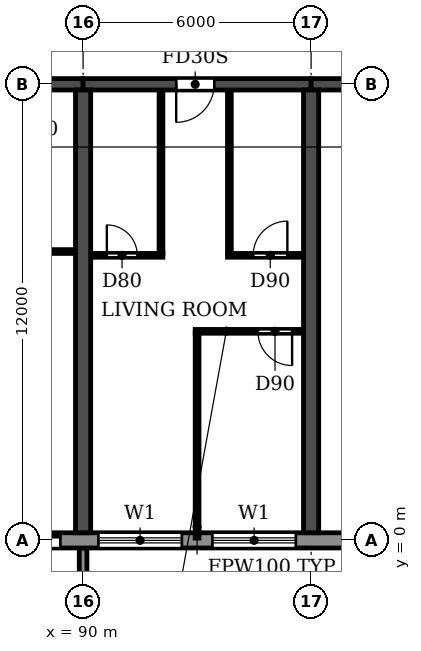
"""IFC4 building model, lengths in metres.
Left out: names, types, materials, properties, quantities, classifications, styles, units other than length and angle.
Written with IfcOpenShell. Run it as: python <this file> out.ifc"""

import sys

from ifc_helpers import new_model, si_unit, direction, frame, frame_2d, origin, place, context, subcontext, project, spatial, polyline, rectangle, outline, extrude, source, transform, mapped, element, fill, save


model = new_model("IFC4")
c1 = context("Model", 3, precision=1e-05, world=origin(), true_north=direction((0.0, 1.0)))
c2 = subcontext(c1, "Body", "Model", "MODEL_VIEW")
j1 = project(units=[si_unit("LENGTHUNIT", "METRE"), si_unit("PLANEANGLEUNIT", "RADIAN")], contexts=[c1])
p1 = place(None, origin())
s1 = spatial("IfcSite", under=j1, at=p1, CompositionType="ELEMENT")
p2 = place(p1, origin())
s2 = spatial("IfcBuilding", under=s1, at=p2, CompositionType="ELEMENT")
p3 = place(p2, frame((0.0, 0.0, 49.8)))
s3 = spatial("IfcBuildingStorey", under=s2, at=p3, CompositionType="ELEMENT", Elevation=49.8)
for number, where, z_axis, x_axis in (
    (1, (90.0, 0.2, 0.0), (0.0, 0.0, 1.0), (0.0, 1.0, 0.0)),
    (2, (96.0, 0.2, 0.0), (0.0, 0.0, 1.0), (0.0, 1.0, 0.0)),
):
    element("IfcWall", number, at=place(p3, frame(where, z_axis=z_axis, x_axis=x_axis)), inside=s3, PredefinedType="SHEAR", context=c2, shape_type="SweptSolid", body=[
        extrude(rectangle(XDim=11.65, YDim=0.4, at=frame_2d((5.825, 0.0))), origin(), (0.0, 0.0, 1.0), 3.0),
    ])
p4 = place(p3, frame((84.0, 12.0, 0.0), z_axis=(0.0, 0.0, 1.0), x_axis=(1.0, 0.0, 0.0)))
e3 = element("IfcWall", 3, at=p4, inside=s3, PredefinedType="SHEAR", context=c2, shape_type="SweptSolid", body=[
    extrude(rectangle(XDim=6.0, YDim=0.3, at=frame_2d((3.0, 0.0))), origin(), (0.0, 0.0, 1.0), 2.4),
])
p5 = place(p4, frame((2.45, 0.0, 0.0)))
e4 = element("IfcOpeningElement", 4, at=p5, cuts=e3, PredefinedType="OPENING", context=c2, shape_type="SweptSolid", body=[
    extrude(rectangle(XDim=1.0, YDim=2.1, at=frame_2d((0.5, 1.05))), frame((0.0, 0.16, 0.0), z_axis=(0.0, -1.0, 0.0), x_axis=(1.0, 0.0, 0.0)), (0.0, 0.0, 1.0), 0.32),
])
p6 = place(p3, frame((90.0, 12.0, 0.0), z_axis=(0.0, 0.0, 1.0), x_axis=(1.0, 0.0, 0.0)))
e5 = element("IfcWall", 5, at=p6, inside=s3, PredefinedType="SHEAR", context=c2, shape_type="SweptSolid", body=[
    extrude(rectangle(XDim=6.0, YDim=0.3, at=frame_2d((3.0, 0.0))), origin(), (0.0, 0.0, 1.0), 2.4),
])
p7 = place(p6, frame((2.45, 0.0, 0.0)))
e6 = element("IfcOpeningElement", 6, at=p7, cuts=e5, PredefinedType="OPENING", context=c2, shape_type="SweptSolid", body=[
    extrude(rectangle(XDim=1.0, YDim=2.1, at=frame_2d((0.5, 1.05))), frame((0.0, 0.16, 0.0), z_axis=(0.0, -1.0, 0.0), x_axis=(1.0, 0.0, 0.0)), (0.0, 0.0, 1.0), 0.32),
])
p8 = place(p3, frame((96.0, 12.0, 0.0), z_axis=(0.0, 0.0, 1.0), x_axis=(1.0, 0.0, 0.0)))
e7 = element("IfcWall", 7, at=p8, inside=s3, PredefinedType="SHEAR", context=c2, shape_type="SweptSolid", body=[
    extrude(rectangle(XDim=5.8, YDim=0.3, at=frame_2d((2.9, 0.0))), origin(), (0.0, 0.0, 1.0), 2.4),
])
p9 = place(p8, frame((2.5, 0.0, 0.0)))
e8 = element("IfcOpeningElement", 8, at=p9, cuts=e7, PredefinedType="OPENING", context=c2, shape_type="SweptSolid", body=[
    extrude(rectangle(XDim=1.0, YDim=2.1, at=frame_2d((0.5, 1.05))), frame((0.0, 0.16, 0.0), z_axis=(0.0, -1.0, 0.0), x_axis=(1.0, 0.0, 0.0)), (0.0, 0.0, 1.0), 0.32),
])
p10 = place(p3, frame((4.683, 0.0, 0.0), z_axis=(0.0, 0.0, 1.0), x_axis=(1.0, 0.0, 0.0)))
e9 = element("IfcWall", 9, at=p10, inside=s3, PredefinedType="STANDARD", context=c2, shape_type="SweptSolid", body=[
    extrude(rectangle(XDim=92.634, YDim=0.4, at=frame_2d((46.317, 0.0))), origin(), (0.0, 0.0, 1.0), 3.0),
])
p11 = place(p10, frame((1.717, 0.0, 0.9)))
e10 = element("IfcOpeningElement", 10, at=p11, cuts=e9, PredefinedType="OPENING", context=c2, shape_type="SweptSolid", body=[
    extrude(rectangle(XDim=2.2, YDim=1.5, at=frame_2d((1.1, 0.75))), frame((0.0, 0.21, 0.0), z_axis=(0.0, -1.0, 0.0), x_axis=(1.0, 0.0, 0.0)), (0.0, 0.0, 1.0), 0.42),
])
p12 = place(p10, frame((4.717, 0.0, 0.9)))
e11 = element("IfcOpeningElement", 11, at=p12, cuts=e9, PredefinedType="OPENING", context=c2, shape_type="SweptSolid", body=[
    extrude(rectangle(XDim=2.2, YDim=1.5, at=frame_2d((1.1, 0.75))), frame((0.0, 0.21, 0.0), z_axis=(0.0, -1.0, 0.0), x_axis=(1.0, 0.0, 0.0)), (0.0, 0.0, 1.0), 0.42),
])
p13 = place(p10, frame((7.717, 0.0, 0.9)))
e12 = element("IfcOpeningElement", 12, at=p13, cuts=e9, PredefinedType="OPENING", context=c2, shape_type="SweptSolid", body=[
    extrude(rectangle(XDim=2.2, YDim=1.5, at=frame_2d((1.1, 0.75))), frame((0.0, 0.21, 0.0), z_axis=(0.0, -1.0, 0.0), x_axis=(1.0, 0.0, 0.0)), (0.0, 0.0, 1.0), 0.42),
])
p14 = place(p10, frame((10.917, 0.0, 0.0)))
e13 = element("IfcOpeningElement", 13, at=p14, cuts=e9, PredefinedType="OPENING", context=c2, shape_type="SweptSolid", body=[
    extrude(rectangle(XDim=1.8, YDim=2.4, at=frame_2d((0.9, 1.2))), frame((0.0, 0.21, 0.0), z_axis=(0.0, -1.0, 0.0), x_axis=(1.0, 0.0, 0.0)), (0.0, 0.0, 1.0), 0.42),
])
p15 = place(p10, frame((13.717, 0.0, 0.9)))
e14 = element("IfcOpeningElement", 14, at=p15, cuts=e9, PredefinedType="OPENING", context=c2, shape_type="SweptSolid", body=[
    extrude(rectangle(XDim=2.2, YDim=1.5, at=frame_2d((1.1, 0.75))), frame((0.0, 0.21, 0.0), z_axis=(0.0, -1.0, 0.0), x_axis=(1.0, 0.0, 0.0)), (0.0, 0.0, 1.0), 0.42),
])
p16 = place(p10, frame((16.717, 0.0, 0.9)))
e15 = element("IfcOpeningElement", 15, at=p16, cuts=e9, PredefinedType="OPENING", context=c2, shape_type="SweptSolid", body=[
    extrude(rectangle(XDim=2.2, YDim=1.5, at=frame_2d((1.1, 0.75))), frame((0.0, 0.21, 0.0), z_axis=(0.0, -1.0, 0.0), x_axis=(1.0, 0.0, 0.0)), (0.0, 0.0, 1.0), 0.42),
])
p17 = place(p10, frame((19.917, 0.0, 0.0)))
e16 = element("IfcOpeningElement", 16, at=p17, cuts=e9, PredefinedType="OPENING", context=c2, shape_type="SweptSolid", body=[
    extrude(rectangle(XDim=1.8, YDim=2.4, at=frame_2d((0.9, 1.2))), frame((0.0, 0.21, 0.0), z_axis=(0.0, -1.0, 0.0), x_axis=(1.0, 0.0, 0.0)), (0.0, 0.0, 1.0), 0.42),
])
p18 = place(p10, frame((22.717, 0.0, 0.9)))
e17 = element("IfcOpeningElement", 17, at=p18, cuts=e9, PredefinedType="OPENING", context=c2, shape_type="SweptSolid", body=[
    extrude(rectangle(XDim=2.2, YDim=1.5, at=frame_2d((1.1, 0.75))), frame((0.0, 0.21, 0.0), z_axis=(0.0, -1.0, 0.0), x_axis=(1.0, 0.0, 0.0)), (0.0, 0.0, 1.0), 0.42),
])
p19 = place(p10, frame((25.717, 0.0, 0.9)))
e18 = element("IfcOpeningElement", 18, at=p19, cuts=e9, PredefinedType="OPENING", context=c2, shape_type="SweptSolid", body=[
    extrude(rectangle(XDim=2.2, YDim=1.5, at=frame_2d((1.1, 0.75))), frame((0.0, 0.21, 0.0), z_axis=(0.0, -1.0, 0.0), x_axis=(1.0, 0.0, 0.0)), (0.0, 0.0, 1.0), 0.42),
])
p20 = place(p10, frame((28.717, 0.0, 0.9)))
e19 = element("IfcOpeningElement", 19, at=p20, cuts=e9, PredefinedType="OPENING", context=c2, shape_type="SweptSolid", body=[
    extrude(rectangle(XDim=2.2, YDim=1.5, at=frame_2d((1.1, 0.75))), frame((0.0, 0.21, 0.0), z_axis=(0.0, -1.0, 0.0), x_axis=(1.0, 0.0, 0.0)), (0.0, 0.0, 1.0), 0.42),
])
p21 = place(p10, frame((31.717, 0.0, 0.9)))
e20 = element("IfcOpeningElement", 20, at=p21, cuts=e9, PredefinedType="OPENING", context=c2, shape_type="SweptSolid", body=[
    extrude(rectangle(XDim=2.2, YDim=1.5, at=frame_2d((1.1, 0.75))), frame((0.0, 0.21, 0.0), z_axis=(0.0, -1.0, 0.0), x_axis=(1.0, 0.0, 0.0)), (0.0, 0.0, 1.0), 0.42),
])
p22 = place(p10, frame((34.917, 0.0, 0.0)))
e21 = element("IfcOpeningElement", 21, at=p22, cuts=e9, PredefinedType="OPENING", context=c2, shape_type="SweptSolid", body=[
    extrude(rectangle(XDim=1.8, YDim=2.4, at=frame_2d((0.9, 1.2))), frame((0.0, 0.21, 0.0), z_axis=(0.0, -1.0, 0.0), x_axis=(1.0, 0.0, 0.0)), (0.0, 0.0, 1.0), 0.42),
])
p23 = place(p10, frame((37.717, 0.0, 0.9)))
e22 = element("IfcOpeningElement", 22, at=p23, cuts=e9, PredefinedType="OPENING", context=c2, shape_type="SweptSolid", body=[
    extrude(rectangle(XDim=2.2, YDim=1.5, at=frame_2d((1.1, 0.75))), frame((0.0, 0.21, 0.0), z_axis=(0.0, -1.0, 0.0), x_axis=(1.0, 0.0, 0.0)), (0.0, 0.0, 1.0), 0.42),
])
p24 = place(p10, frame((40.717, 0.0, 0.9)))
e23 = element("IfcOpeningElement", 23, at=p24, cuts=e9, PredefinedType="OPENING", context=c2, shape_type="SweptSolid", body=[
    extrude(rectangle(XDim=2.2, YDim=1.5, at=frame_2d((1.1, 0.75))), frame((0.0, 0.21, 0.0), z_axis=(0.0, -1.0, 0.0), x_axis=(1.0, 0.0, 0.0)), (0.0, 0.0, 1.0), 0.42),
])
p25 = place(p10, frame((43.717, 0.0, 0.9)))
e24 = element("IfcOpeningElement", 24, at=p25, cuts=e9, PredefinedType="OPENING", context=c2, shape_type="SweptSolid", body=[
    extrude(rectangle(XDim=2.2, YDim=1.5, at=frame_2d((1.1, 0.75))), frame((0.0, 0.21, 0.0), z_axis=(0.0, -1.0, 0.0), x_axis=(1.0, 0.0, 0.0)), (0.0, 0.0, 1.0), 0.42),
])
p26 = place(p10, frame((46.917, 0.0, 0.0)))
e25 = element("IfcOpeningElement", 25, at=p26, cuts=e9, PredefinedType="OPENING", context=c2, shape_type="SweptSolid", body=[
    extrude(rectangle(XDim=1.8, YDim=2.4, at=frame_2d((0.9, 1.2))), frame((0.0, 0.21, 0.0), z_axis=(0.0, -1.0, 0.0), x_axis=(1.0, 0.0, 0.0)), (0.0, 0.0, 1.0), 0.42),
])
p27 = place(p10, frame((49.717, 0.0, 0.9)))
e26 = element("IfcOpeningElement", 26, at=p27, cuts=e9, PredefinedType="OPENING", context=c2, shape_type="SweptSolid", body=[
    extrude(rectangle(XDim=2.2, YDim=1.5, at=frame_2d((1.1, 0.75))), frame((0.0, 0.21, 0.0), z_axis=(0.0, -1.0, 0.0), x_axis=(1.0, 0.0, 0.0)), (0.0, 0.0, 1.0), 0.42),
])
p28 = place(p10, frame((52.717, 0.0, 0.9)))
e27 = element("IfcOpeningElement", 27, at=p28, cuts=e9, PredefinedType="OPENING", context=c2, shape_type="SweptSolid", body=[
    extrude(rectangle(XDim=2.2, YDim=1.5, at=frame_2d((1.1, 0.75))), frame((0.0, 0.21, 0.0), z_axis=(0.0, -1.0, 0.0), x_axis=(1.0, 0.0, 0.0)), (0.0, 0.0, 1.0), 0.42),
])
p29 = place(p10, frame((55.717, 0.0, 0.9)))
e28 = element("IfcOpeningElement", 28, at=p29, cuts=e9, PredefinedType="OPENING", context=c2, shape_type="SweptSolid", body=[
    extrude(rectangle(XDim=2.2, YDim=1.5, at=frame_2d((1.1, 0.75))), frame((0.0, 0.21, 0.0), z_axis=(0.0, -1.0, 0.0), x_axis=(1.0, 0.0, 0.0)), (0.0, 0.0, 1.0), 0.42),
])
p30 = place(p10, frame((58.917, 0.0, 0.0)))
e29 = element("IfcOpeningElement", 29, at=p30, cuts=e9, PredefinedType="OPENING", context=c2, shape_type="SweptSolid", body=[
    extrude(rectangle(XDim=1.8, YDim=2.4, at=frame_2d((0.9, 1.2))), frame((0.0, 0.21, 0.0), z_axis=(0.0, -1.0, 0.0), x_axis=(1.0, 0.0, 0.0)), (0.0, 0.0, 1.0), 0.42),
])
p31 = place(p10, frame((61.717, 0.0, 0.9)))
e30 = element("IfcOpeningElement", 30, at=p31, cuts=e9, PredefinedType="OPENING", context=c2, shape_type="SweptSolid", body=[
    extrude(rectangle(XDim=2.2, YDim=1.5, at=frame_2d((1.1, 0.75))), frame((0.0, 0.21, 0.0), z_axis=(0.0, -1.0, 0.0), x_axis=(1.0, 0.0, 0.0)), (0.0, 0.0, 1.0), 0.42),
])
p32 = place(p10, frame((64.717, 0.0, 0.9)))
e31 = element("IfcOpeningElement", 31, at=p32, cuts=e9, PredefinedType="OPENING", context=c2, shape_type="SweptSolid", body=[
    extrude(rectangle(XDim=2.2, YDim=1.5, at=frame_2d((1.1, 0.75))), frame((0.0, 0.21, 0.0), z_axis=(0.0, -1.0, 0.0), x_axis=(1.0, 0.0, 0.0)), (0.0, 0.0, 1.0), 0.42),
])
p33 = place(p10, frame((67.717, 0.0, 0.9)))
e32 = element("IfcOpeningElement", 32, at=p33, cuts=e9, PredefinedType="OPENING", context=c2, shape_type="SweptSolid", body=[
    extrude(rectangle(XDim=2.2, YDim=1.5, at=frame_2d((1.1, 0.75))), frame((0.0, 0.21, 0.0), z_axis=(0.0, -1.0, 0.0), x_axis=(1.0, 0.0, 0.0)), (0.0, 0.0, 1.0), 0.42),
])
p34 = place(p10, frame((70.917, 0.0, 0.0)))
e33 = element("IfcOpeningElement", 33, at=p34, cuts=e9, PredefinedType="OPENING", context=c2, shape_type="SweptSolid", body=[
    extrude(rectangle(XDim=1.8, YDim=2.4, at=frame_2d((0.9, 1.2))), frame((0.0, 0.21, 0.0), z_axis=(0.0, -1.0, 0.0), x_axis=(1.0, 0.0, 0.0)), (0.0, 0.0, 1.0), 0.42),
])
p35 = place(p10, frame((73.717, 0.0, 0.9)))
e34 = element("IfcOpeningElement", 34, at=p35, cuts=e9, PredefinedType="OPENING", context=c2, shape_type="SweptSolid", body=[
    extrude(rectangle(XDim=2.2, YDim=1.5, at=frame_2d((1.1, 0.75))), frame((0.0, 0.21, 0.0), z_axis=(0.0, -1.0, 0.0), x_axis=(1.0, 0.0, 0.0)), (0.0, 0.0, 1.0), 0.42),
])
p36 = place(p10, frame((76.717, 0.0, 0.9)))
e35 = element("IfcOpeningElement", 35, at=p36, cuts=e9, PredefinedType="OPENING", context=c2, shape_type="SweptSolid", body=[
    extrude(rectangle(XDim=2.2, YDim=1.5, at=frame_2d((1.1, 0.75))), frame((0.0, 0.21, 0.0), z_axis=(0.0, -1.0, 0.0), x_axis=(1.0, 0.0, 0.0)), (0.0, 0.0, 1.0), 0.42),
])
p37 = place(p10, frame((79.717, 0.0, 0.9)))
e36 = element("IfcOpeningElement", 36, at=p37, cuts=e9, PredefinedType="OPENING", context=c2, shape_type="SweptSolid", body=[
    extrude(rectangle(XDim=2.2, YDim=1.5, at=frame_2d((1.1, 0.75))), frame((0.0, 0.21, 0.0), z_axis=(0.0, -1.0, 0.0), x_axis=(1.0, 0.0, 0.0)), (0.0, 0.0, 1.0), 0.42),
])
p38 = place(p10, frame((82.917, 0.0, 0.0)))
e37 = element("IfcOpeningElement", 37, at=p38, cuts=e9, PredefinedType="OPENING", context=c2, shape_type="SweptSolid", body=[
    extrude(rectangle(XDim=1.8, YDim=2.4, at=frame_2d((0.9, 1.2))), frame((0.0, 0.21, 0.0), z_axis=(0.0, -1.0, 0.0), x_axis=(1.0, 0.0, 0.0)), (0.0, 0.0, 1.0), 0.42),
])
p39 = place(p10, frame((85.717, 0.0, 0.9)))
e38 = element("IfcOpeningElement", 38, at=p39, cuts=e9, PredefinedType="OPENING", context=c2, shape_type="SweptSolid", body=[
    extrude(rectangle(XDim=2.2, YDim=1.5, at=frame_2d((1.1, 0.75))), frame((0.0, 0.21, 0.0), z_axis=(0.0, -1.0, 0.0), x_axis=(1.0, 0.0, 0.0)), (0.0, 0.0, 1.0), 0.42),
])
p40 = place(p10, frame((88.717, 0.0, 0.9)))
e39 = element("IfcOpeningElement", 39, at=p40, cuts=e9, PredefinedType="OPENING", context=c2, shape_type="SweptSolid", body=[
    extrude(rectangle(XDim=2.2, YDim=1.5, at=frame_2d((1.1, 0.75))), frame((0.0, 0.21, 0.0), z_axis=(0.0, -1.0, 0.0), x_axis=(1.0, 0.0, 0.0)), (0.0, 0.0, 1.0), 0.42),
])
m1 = source(origin(), c2, "Body", "SweptSolid", [
    extrude(outline(polyline([(0.0, 0.0), (0.2, 0.0), (0.2, 1.65), (0.0, 1.65), (0.0, 0.0)])), origin(), (0.0, 0.0, 1.0), 3.1),
])
p41 = place(p3, frame((89.9, -1.85, 0.0)))
e40 = element("IfcWall", 40, at=p41, inside=s3, PredefinedType="STANDARD", context=c2, shape_type="MappedRepresentation", body=[
    mapped(m1, transform((0.0, 0.0, 0.0))),
])
p42 = place(p3, frame((92.95, 5.5, 0.0), z_axis=(0.0, 0.0, 1.0), x_axis=(1.0, 0.0, 0.0)))
e41 = element("IfcWall", 41, at=p42, inside=s3, PredefinedType="PARTITIONING", context=c2, shape_type="SweptSolid", body=[
    extrude(rectangle(XDim=2.84, YDim=0.1, at=frame_2d((1.42, 0.0))), origin(), (0.0, 0.0, 1.0), 3.0),
])
p43 = place(p42, frame((1.65, 0.0, 0.0)))
e42 = element("IfcOpeningElement", 42, at=p43, cuts=e41, PredefinedType="OPENING", context=c2, shape_type="SweptSolid", body=[
    extrude(rectangle(XDim=0.9, YDim=2.1, at=frame_2d((0.45, 1.05))), frame((0.0, 0.06, 0.0), z_axis=(0.0, -1.0, 0.0), x_axis=(1.0, 0.0, 0.0)), (0.0, 0.0, 1.0), 0.12),
])
p44 = place(p3, frame((90.21, 7.5, 0.0), z_axis=(0.0, 0.0, 1.0), x_axis=(1.0, 0.0, 0.0)))
e43 = element("IfcWall", 43, at=p44, inside=s3, PredefinedType="PARTITIONING", context=c2, shape_type="SweptSolid", body=[
    extrude(rectangle(XDim=1.89, YDim=0.1, at=frame_2d((0.945, 0.0))), origin(), (0.0, 0.0, 1.0), 3.0),
])
p45 = place(p44, frame((0.415, 0.0, 0.0)))
e44 = element("IfcOpeningElement", 44, at=p45, cuts=e43, PredefinedType="OPENING", context=c2, shape_type="SweptSolid", body=[
    extrude(rectangle(XDim=0.8, YDim=2.1, at=frame_2d((0.4, 1.05))), frame((0.0, 0.06, 0.0), z_axis=(0.0, -1.0, 0.0), x_axis=(1.0, 0.0, 0.0)), (0.0, 0.0, 1.0), 0.12),
])
p46 = place(p3, frame((93.8, 7.5, 0.0), z_axis=(0.0, 0.0, 1.0), x_axis=(1.0, 0.0, 0.0)))
e45 = element("IfcWall", 45, at=p46, inside=s3, PredefinedType="PARTITIONING", context=c2, shape_type="SweptSolid", body=[
    extrude(rectangle(XDim=1.99, YDim=0.1, at=frame_2d((0.995, 0.0))), origin(), (0.0, 0.0, 1.0), 3.0),
])
p47 = place(p46, frame((0.675, 0.0, 0.0)))
e46 = element("IfcOpeningElement", 46, at=p47, cuts=e45, PredefinedType="OPENING", context=c2, shape_type="SweptSolid", body=[
    extrude(rectangle(XDim=0.9, YDim=2.1, at=frame_2d((0.45, 1.05))), frame((0.0, 0.06, 0.0), z_axis=(0.0, -1.0, 0.0), x_axis=(1.0, 0.0, 0.0)), (0.0, 0.0, 1.0), 0.12),
])
p48 = place(p3, frame((87.8, 7.6, 0.0), z_axis=(0.0, 0.0, 1.0), x_axis=(1.0, 0.0, 0.0)))
e47 = element("IfcWall", 47, at=p48, inside=s3, PredefinedType="PARTITIONING", context=c2, shape_type="SweptSolid", body=[
    extrude(rectangle(XDim=1.99, YDim=0.1, at=frame_2d((0.995, 0.0))), origin(), (0.0, 0.0, 1.0), 3.0),
])
p49 = place(p3, frame((92.05, 7.55, 0.0), z_axis=(0.0, 0.0, 1.0), x_axis=(0.0, 1.0, 0.0)))
e48 = element("IfcWall", 48, at=p49, inside=s3, PredefinedType="PARTITIONING", context=c2, shape_type="SweptSolid", body=[
    extrude(rectangle(XDim=4.29, YDim=0.1, at=frame_2d((2.145, 0.0))), origin(), (0.0, 0.0, 1.0), 3.0),
])
p50 = place(p3, frame((93.0, 0.06, 0.0), z_axis=(0.0, 0.0, 1.0), x_axis=(0.0, 1.0, 0.0)))
e49 = element("IfcWall", 49, at=p50, inside=s3, PredefinedType="PARTITIONING", context=c2, shape_type="SweptSolid", body=[
    extrude(rectangle(XDim=5.39, YDim=0.1, at=frame_2d((2.695, 0.0))), origin(), (0.0, 0.0, 1.0), 3.0),
])
p51 = place(p3, frame((93.85, 7.55, 0.0), z_axis=(0.0, 0.0, 1.0), x_axis=(0.0, 1.0, 0.0)))
e50 = element("IfcWall", 50, at=p51, inside=s3, PredefinedType="PARTITIONING", context=c2, shape_type="SweptSolid", body=[
    extrude(rectangle(XDim=4.29, YDim=0.1, at=frame_2d((2.145, 0.0))), origin(), (0.0, 0.0, 1.0), 3.0),
])
p52 = place(p38, origin())
e51 = element("IfcDoor", 51, at=p52, inside=s3, OperationType="DOUBLE_DOOR_SLIDING", PredefinedType="DOOR", context=c2, shape_type="SweptSolid", body=[
    extrude(rectangle(XDim=1.8, YDim=2.4, at=frame_2d((0.9, 1.2))), frame((0.0, 0.025, 0.0), z_axis=(0.0, -1.0, 0.0), x_axis=(1.0, 0.0, 0.0)), (0.0, 0.0, 1.0), 0.05),
])
fill(e37, e51)
p53 = place(p39, origin())
e52 = element("IfcWindow", 52, at=p53, inside=s3, PartitioningType="DOUBLE_PANEL_HORIZONTAL", PredefinedType="WINDOW", context=c2, shape_type="SweptSolid", body=[
    extrude(rectangle(XDim=2.2, YDim=1.5, at=frame_2d((1.1, 0.75))), frame((0.0, 0.03, 0.0), z_axis=(0.0, -1.0, 0.0), x_axis=(1.0, 0.0, 0.0)), (0.0, 0.0, 1.0), 0.06),
])
fill(e38, e52)
p54 = place(p40, origin())
e53 = element("IfcWindow", 53, at=p54, inside=s3, PartitioningType="DOUBLE_PANEL_HORIZONTAL", PredefinedType="WINDOW", context=c2, shape_type="SweptSolid", body=[
    extrude(rectangle(XDim=2.2, YDim=1.5, at=frame_2d((1.1, 0.75))), frame((0.0, 0.03, 0.0), z_axis=(0.0, -1.0, 0.0), x_axis=(1.0, 0.0, 0.0)), (0.0, 0.0, 1.0), 0.06),
])
fill(e39, e53)
p55 = place(p45, origin())
e54 = element("IfcDoor", 54, at=p55, inside=s3, OperationType="SINGLE_SWING_LEFT", PredefinedType="DOOR", context=c2, shape_type="SweptSolid", body=[
    extrude(rectangle(XDim=0.8, YDim=2.1, at=frame_2d((0.4, 1.05))), frame((0.0, 0.025, 0.0), z_axis=(0.0, -1.0, 0.0), x_axis=(1.0, 0.0, 0.0)), (0.0, 0.0, 1.0), 0.05),
])
fill(e44, e54)
p56 = place(p7, frame((1.0, 0.0, 0.0), z_axis=(0.0, 0.0, 1.0), x_axis=(-1.0, 0.0, 0.0)))
e55 = element("IfcDoor", 55, at=p56, inside=s3, OperationType="SINGLE_SWING_RIGHT", PredefinedType="DOOR", context=c2, shape_type="SweptSolid", body=[
    extrude(rectangle(XDim=1.0, YDim=2.1, at=frame_2d((0.5, 1.05))), frame((0.0, 0.025, 0.0), z_axis=(0.0, -1.0, 0.0), x_axis=(1.0, 0.0, 0.0)), (0.0, 0.0, 1.0), 0.05),
])
fill(e6, e55)
p57 = place(p47, origin())
e56 = element("IfcDoor", 56, at=p57, inside=s3, OperationType="SINGLE_SWING_RIGHT", PredefinedType="DOOR", context=c2, shape_type="SweptSolid", body=[
    extrude(rectangle(XDim=0.9, YDim=2.1, at=frame_2d((0.45, 1.05))), frame((0.0, 0.025, 0.0), z_axis=(0.0, -1.0, 0.0), x_axis=(1.0, 0.0, 0.0)), (0.0, 0.0, 1.0), 0.05),
])
fill(e46, e56)
p58 = place(p43, frame((0.9, 0.0, 0.0), z_axis=(0.0, 0.0, 1.0), x_axis=(-1.0, 0.0, 0.0)))
e57 = element("IfcDoor", 57, at=p58, inside=s3, OperationType="SINGLE_SWING_LEFT", PredefinedType="DOOR", context=c2, shape_type="SweptSolid", body=[
    extrude(rectangle(XDim=0.9, YDim=2.1, at=frame_2d((0.45, 1.05))), frame((0.0, 0.025, 0.0), z_axis=(0.0, -1.0, 0.0), x_axis=(1.0, 0.0, 0.0)), (0.0, 0.0, 1.0), 0.05),
])
fill(e42, e57)
save(model, sys.argv[1])
